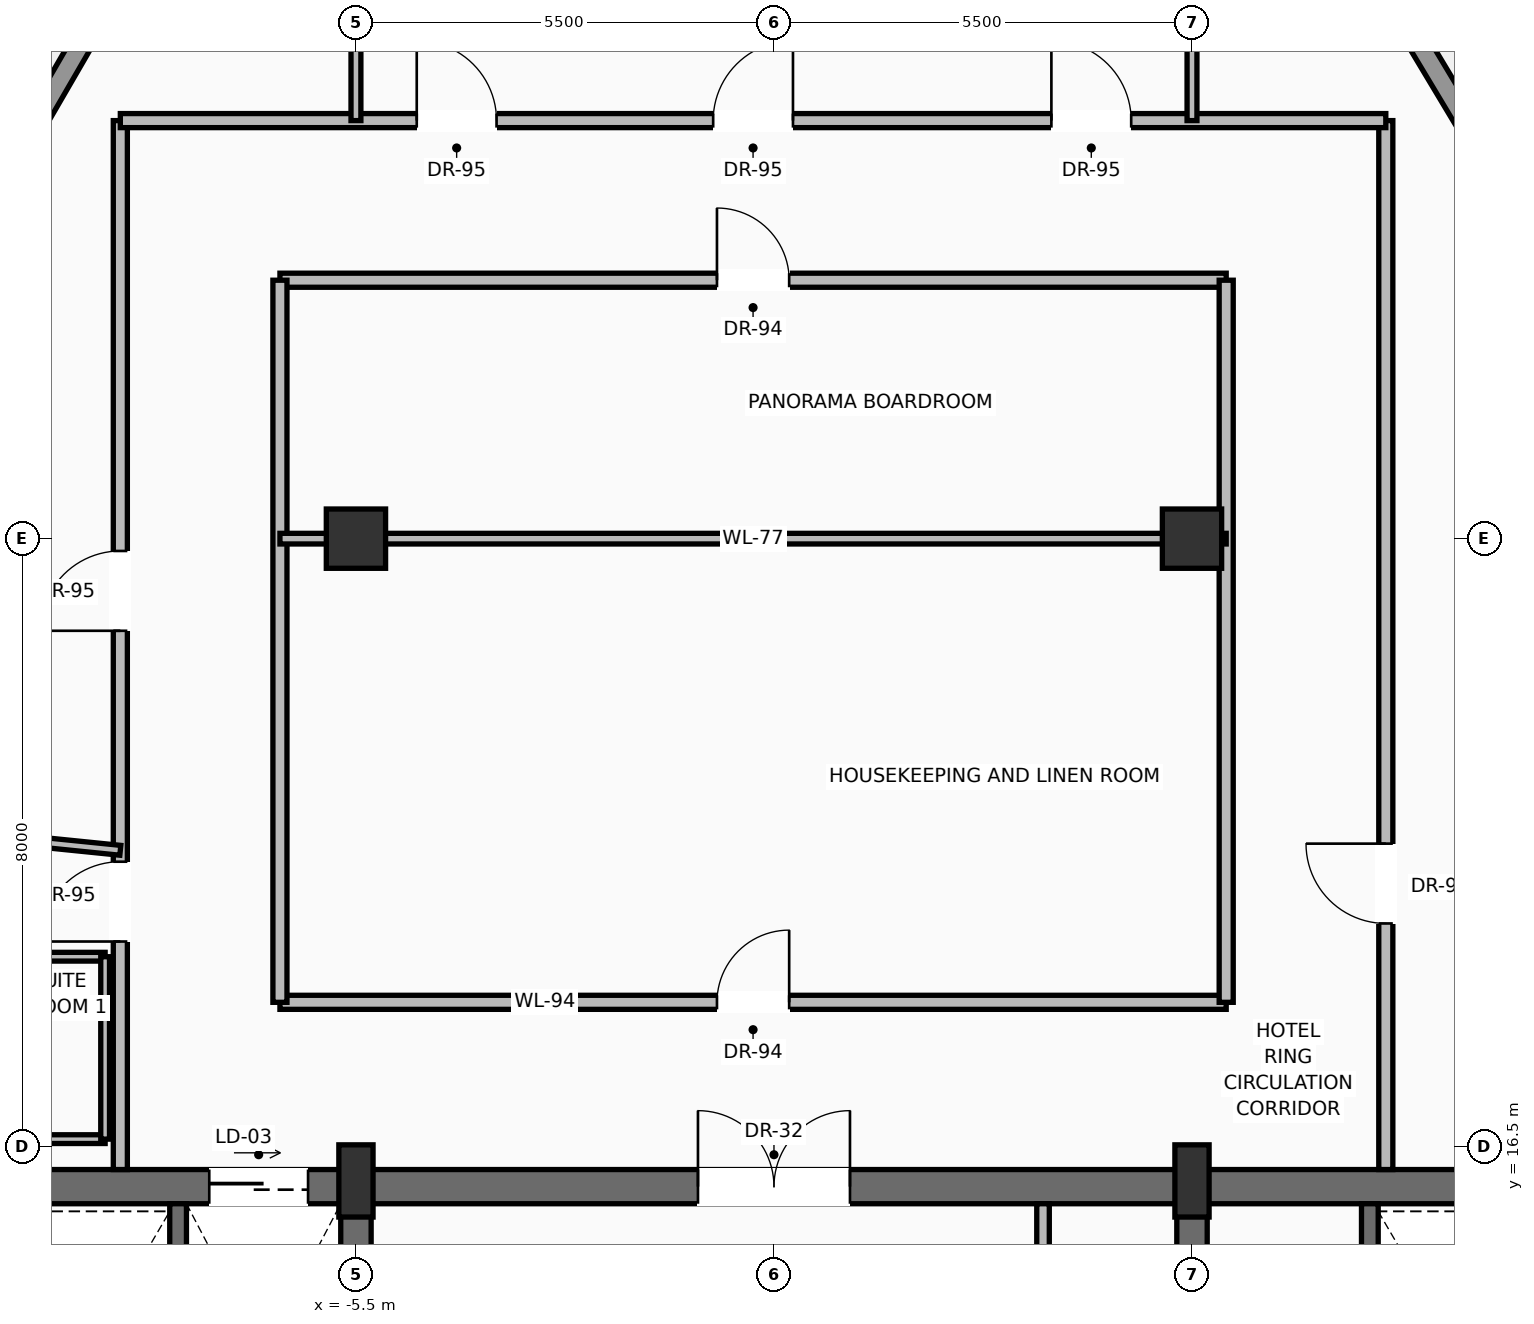
"""IFC4 building model, lengths in metres.
Left out: names, types, materials, properties, quantities, classifications, styles, units other than length and angle.
Written with IfcOpenShell. Run it as: python <this file> out.ifc"""

import sys

from ifc_helpers import new_model, si_unit, direction, frame, frame_2d, origin, origin_2d, place, context, subcontext, project, spatial, rectangle, extrude, source, transform, mapped, element, fill, save


model = new_model("IFC4")
c1 = context("Model", 3, precision=1e-05, world=origin(), true_north=direction((0.0, 1.0)))
c2 = subcontext(c1, "Body", "Model", "MODEL_VIEW")
j1 = project(units=[si_unit("LENGTHUNIT", "METRE"), si_unit("PLANEANGLEUNIT", "RADIAN")], contexts=[c1])
p1 = place(None, origin())
s1 = spatial("IfcSite", under=j1, at=p1, CompositionType="ELEMENT")
p2 = place(p1, origin())
s2 = spatial("IfcBuilding", under=s1, at=p2, CompositionType="ELEMENT")
p3 = place(p2, frame((0.0, 0.0, 266.1)))
s3 = spatial("IfcBuildingStorey", under=s2, at=p3, CompositionType="ELEMENT", Elevation=266.1)
p4 = place(p3, frame((-10.6, 15.975, 0.0), z_axis=(0.0, 0.0, 1.0), x_axis=(1.0, 0.0, 0.0)))
e1 = element("IfcWall", 1, at=p4, inside=s3, PredefinedType="SHEAR", context=c2, shape_type="SweptSolid", body=[
    extrude(rectangle(XDim=21.2, YDim=0.45, at=frame_2d((10.6, 0.0))), origin(), (0.0, 0.0, 1.0), 3.24),
])
p5 = place(p4, frame((3.17, 0.0, 0.0)))
e2 = element("IfcOpeningElement", 2, at=p5, cuts=e1, PredefinedType="OPENING", context=c2, shape_type="SweptSolid", body=[
    extrude(rectangle(XDim=1.3, YDim=2.3, at=frame_2d((0.65, 1.15))), frame((0.0, 0.235, 0.0), z_axis=(0.0, -1.0, 0.0), x_axis=(1.0, 0.0, 0.0)), (0.0, 0.0, 1.0), 0.47),
])
p6 = place(p4, frame((9.6, 0.0, 0.0)))
e3 = element("IfcOpeningElement", 3, at=p6, cuts=e1, PredefinedType="OPENING", context=c2, shape_type="SweptSolid", body=[
    extrude(rectangle(XDim=2.0, YDim=2.4, at=frame_2d((1.0, 1.2))), frame((0.0, 0.235, 0.0), z_axis=(0.0, -1.0, 0.0), x_axis=(1.0, 0.0, 0.0)), (0.0, 0.0, 1.0), 0.47),
])
p7 = place(p3, frame((-5.5, 0.625, 0.0), z_axis=(0.0, 0.0, 1.0), x_axis=(0.0, 1.0, 0.0)))
e4 = element("IfcWall", 4, at=p7, inside=s3, PredefinedType="SHEAR", context=c2, shape_type="SweptSolid", body=[
    extrude(rectangle(XDim=15.35, YDim=0.4, at=frame_2d((7.675, 0.0))), origin(), (0.0, 0.0, 1.0), 3.24),
])
p8 = place(p7, frame((8.875, 0.0, 0.0)))
e5 = element("IfcOpeningElement", 5, at=p8, cuts=e4, PredefinedType="OPENING", context=c2, shape_type="SweptSolid", body=[
    extrude(rectangle(XDim=1.1, YDim=2.2, at=frame_2d((0.55, 1.1))), frame((0.0, 0.21, 0.0), z_axis=(0.0, -1.0, 0.0), x_axis=(1.0, 0.0, 0.0)), (0.0, 0.0, 1.0), 0.42),
])
p9 = place(p3, frame((5.5, 0.625, 0.0), z_axis=(0.0, 0.0, 1.0), x_axis=(0.0, 1.0, 0.0)))
e6 = element("IfcWall", 6, at=p9, inside=s3, PredefinedType="SHEAR", context=c2, shape_type="SweptSolid", body=[
    extrude(rectangle(XDim=15.35, YDim=0.4, at=frame_2d((7.675, 0.0))), origin(), (0.0, 0.0, 1.0), 3.24),
])
p10 = place(p9, frame((8.875, 0.0, 0.0)))
e7 = element("IfcOpeningElement", 7, at=p10, cuts=e6, PredefinedType="OPENING", context=c2, shape_type="SweptSolid", body=[
    extrude(rectangle(XDim=1.1, YDim=2.2, at=frame_2d((0.55, 1.1))), frame((0.0, 0.21, 0.0), z_axis=(0.0, -1.0, 0.0), x_axis=(1.0, 0.0, 0.0)), (0.0, 0.0, 1.0), 0.42),
])
m1 = source(origin(), c2, "Body", "SweptSolid", [
    extrude(rectangle(XDim=0.45, YDim=0.95, at=origin_2d()), origin(), (0.0, 0.0, 1.0), 3.45),
])
for number, where, z_axis, x_axis in (
    (8, (-5.5, 16.05, 0.0), (0.0, 0.0, 1.0), (1.0, 0.0, 0.0)),
    (9, (5.5, 16.05, 0.0), (0.0, 0.0, 1.0), (1.0, 0.0, 0.0)),
):
    element("IfcColumn", number, at=place(p3, frame(where, z_axis=z_axis, x_axis=x_axis)), inside=s3, PredefinedType="PILASTER", context=c2, shape_type="MappedRepresentation", body=[
        mapped(m1, transform((0.0, 0.0, 0.0), scale=1.0)),
    ])
m2 = source(origin(), c2, "Body", "SweptSolid", [
    extrude(rectangle(XDim=0.78, YDim=0.78, at=origin_2d()), origin(), (0.0, 0.0, 1.0), 3.45),
])
for number, where, z_axis, x_axis in (
    (10, (-5.5, 24.5, 0.0), (0.0, 0.0, 1.0), (1.0, 0.0, 0.0)),
    (11, (5.5, 24.5, 0.0), (0.0, 0.0, 1.0), (1.0, 0.0, 0.0)),
):
    element("IfcColumn", number, at=place(p3, frame(where, z_axis=z_axis, x_axis=x_axis)), inside=s3, PredefinedType="COLUMN", context=c2, shape_type="MappedRepresentation", body=[
        mapped(m2, transform((0.0, 0.0, 0.0), scale=1.0)),
    ])
p11 = place(p3, frame((-18.713, 14.466, 0.0), z_axis=(0.0, 0.0, 1.0), x_axis=(0.501837095331, 0.864962155097, 0.0)))
e12 = element("IfcWall", 12, at=p11, inside=s3, PredefinedType="SOLIDWALL", context=c2, shape_type="SweptSolid", body=[
    extrude(rectangle(XDim=19.956, YDim=0.28, at=frame_2d((9.978, 0.0))), origin(), (0.0, 0.0, 1.0), 2.82),
])
p12 = place(p11, frame((4.789, 0.0, 0.0)))
e13 = element("IfcOpeningElement", 13, at=p12, cuts=e12, PredefinedType="OPENING", context=c2, shape_type="SweptSolid", body=[
    extrude(rectangle(XDim=1.6, YDim=2.35, at=frame_2d((0.8, 1.175))), frame((0.0, 0.15, 0.0), z_axis=(0.0, -1.0, 0.0), x_axis=(1.0, 0.0, 0.0)), (0.0, 0.0, 1.0), 0.3),
])
p13 = place(p11, frame((13.57, 0.0, 0.9)))
e14 = element("IfcOpeningElement", 14, at=p13, cuts=e12, PredefinedType="OPENING", context=c2, shape_type="SweptSolid", body=[
    extrude(rectangle(XDim=1.55, YDim=1.75, at=frame_2d((0.775, 0.875))), frame((0.0, 0.15, 0.0), z_axis=(0.0, -1.0, 0.0), x_axis=(1.0, 0.0, 0.0)), (0.0, 0.0, 1.0), 0.3),
])
p14 = place(p3, frame((7.995, 31.836, 0.0), z_axis=(0.0, 0.0, 1.0), x_axis=(0.514643481436, -0.8574042728, 0.0)))
e15 = element("IfcWall", 15, at=p14, inside=s3, PredefinedType="SOLIDWALL", context=c2, shape_type="SweptSolid", body=[
    extrude(rectangle(XDim=19.928, YDim=0.28, at=frame_2d((9.964, 0.0))), origin(), (0.0, 0.0, 1.0), 2.82),
])
p15 = place(p14, frame((4.783, 0.0, 0.0)))
e16 = element("IfcOpeningElement", 16, at=p15, cuts=e15, PredefinedType="OPENING", context=c2, shape_type="SweptSolid", body=[
    extrude(rectangle(XDim=1.6, YDim=2.35, at=frame_2d((0.8, 1.175))), frame((0.0, 0.15, 0.0), z_axis=(0.0, -1.0, 0.0), x_axis=(1.0, 0.0, 0.0)), (0.0, 0.0, 1.0), 0.3),
])
p16 = place(p14, frame((13.551, 0.0, 0.9)))
e17 = element("IfcOpeningElement", 17, at=p16, cuts=e15, PredefinedType="OPENING", context=c2, shape_type="SweptSolid", body=[
    extrude(rectangle(XDim=1.55, YDim=1.75, at=frame_2d((0.775, 0.875))), frame((0.0, 0.15, 0.0), z_axis=(0.0, -1.0, 0.0), x_axis=(1.0, 0.0, 0.0)), (0.0, 0.0, 1.0), 0.3),
])
for number, where, z_axis, x_axis in (
    (18, (-7.84, 11.87, 0.0), (0.0, 0.0, 1.0), (0.0, 1.0, 0.0)),
    (19, (7.84, 11.87, 0.0), (0.0, 0.0, 1.0), (0.0, 1.0, 0.0)),
):
    element("IfcWall", number, at=place(p3, frame(where, z_axis=z_axis, x_axis=x_axis)), inside=s3, PredefinedType="SOLIDWALL", context=c2, shape_type="SweptSolid", body=[
        extrude(rectangle(XDim=3.88, YDim=0.22, at=frame_2d((1.94, 0.0))), origin(), (0.0, 0.0, 1.0), 3.24),
    ])
p17 = place(p3, frame((3.54, 11.22, 0.0), z_axis=(0.0, 0.0, 1.0), x_axis=(0.0, 1.0, 0.0)))
e20 = element("IfcWall", 20, at=p17, inside=s3, PredefinedType="PARTITIONING", context=c2, shape_type="SweptSolid", body=[
    extrude(rectangle(XDim=4.53, YDim=0.165, at=frame_2d((2.265, 0.0))), origin(), (0.0, 0.0, 1.0), 3.232),
])
p18 = place(p17, frame((1.25, 0.0, 0.0)))
e21 = element("IfcOpeningElement", 21, at=p18, cuts=e20, PredefinedType="OPENING", context=c2, shape_type="SweptSolid", body=[
    extrude(rectangle(XDim=0.9, YDim=2.1, at=frame_2d((0.45, 1.05))), frame((0.0, 0.093, 0.0), z_axis=(0.0, -1.0, 0.0), x_axis=(1.0, 0.0, 0.0)), (0.0, 0.0, 1.0), 0.185),
])
p19 = place(p3, frame((-6.5, 18.4, 0.0), z_axis=(0.0, 0.0, 1.0), x_axis=(1.0, 0.0, 0.0)))
e22 = element("IfcWall", 22, at=p19, inside=s3, PredefinedType="PARTITIONING", context=c2, shape_type="SweptSolid", body=[
    extrude(rectangle(XDim=12.45, YDim=0.185, at=frame_2d((6.225, 0.0))), origin(), (0.0, 0.0, 1.0), 3.232),
])
p20 = place(p19, frame((5.75, 0.0, 0.0)))
e23 = element("IfcOpeningElement", 23, at=p20, cuts=e22, PredefinedType="OPENING", context=c2, shape_type="SweptSolid", body=[
    extrude(rectangle(XDim=0.95, YDim=2.2, at=frame_2d((0.475, 1.1))), frame((0.0, 0.103, 0.0), z_axis=(0.0, -1.0, 0.0), x_axis=(1.0, 0.0, 0.0)), (0.0, 0.0, 1.0), 0.205),
])
p21 = place(p3, frame((-6.5, 27.9, 0.0), z_axis=(0.0, 0.0, 1.0), x_axis=(1.0, 0.0, 0.0)))
e24 = element("IfcWall", 24, at=p21, inside=s3, PredefinedType="PARTITIONING", context=c2, shape_type="SweptSolid", body=[
    extrude(rectangle(XDim=12.45, YDim=0.185, at=frame_2d((6.225, 0.0))), origin(), (0.0, 0.0, 1.0), 2.885),
])
p22 = place(p21, frame((5.75, 0.0, 0.0)))
e25 = element("IfcOpeningElement", 25, at=p22, cuts=e24, PredefinedType="OPENING", context=c2, shape_type="SweptSolid", body=[
    extrude(rectangle(XDim=0.95, YDim=2.2, at=frame_2d((0.475, 1.1))), frame((0.0, 0.103, 0.0), z_axis=(0.0, -1.0, 0.0), x_axis=(1.0, 0.0, 0.0)), (0.0, 0.0, 1.0), 0.205),
])
for number, where, z_axis, x_axis in (
    (26, (-6.5, 18.4, 0.0), (0.0, 0.0, 1.0), (0.0, 1.0, 0.0)),
    (27, (5.95, 18.4, 0.0), (0.0, 0.0, 1.0), (0.0, 1.0, 0.0)),
):
    element("IfcWall", number, at=place(p3, frame(where, z_axis=z_axis, x_axis=x_axis)), inside=s3, PredefinedType="PARTITIONING", context=c2, shape_type="SweptSolid", body=[
        extrude(rectangle(XDim=9.5, YDim=0.185, at=frame_2d((4.75, 0.0))), origin(), (0.0, 0.0, 1.0), 3.232),
    ])
p23 = place(p3, frame((-8.6, 16.2, 0.0), z_axis=(0.0, 0.0, 1.0), x_axis=(0.0, 1.0, 0.0)))
e28 = element("IfcWall", 28, at=p23, inside=s3, PredefinedType="PARTITIONING", context=c2, shape_type="SweptSolid", body=[
    extrude(rectangle(XDim=13.8, YDim=0.185, at=frame_2d((6.9, 0.0))), origin(), (0.0, 0.0, 1.0), 3.232),
])
p24 = place(p23, frame((3.0, 0.0, 0.0)))
e29 = element("IfcOpeningElement", 29, at=p24, cuts=e28, PredefinedType="OPENING", context=c2, shape_type="SweptSolid", body=[
    extrude(rectangle(XDim=1.05, YDim=2.25, at=frame_2d((0.525, 1.125))), frame((0.0, 0.103, 0.0), z_axis=(0.0, -1.0, 0.0), x_axis=(1.0, 0.0, 0.0)), (0.0, 0.0, 1.0), 0.205),
])
p25 = place(p23, frame((7.088, 0.0, 0.0)))
e30 = element("IfcOpeningElement", 30, at=p25, cuts=e28, PredefinedType="OPENING", context=c2, shape_type="SweptSolid", body=[
    extrude(rectangle(XDim=1.05, YDim=2.25, at=frame_2d((0.525, 1.125))), frame((0.0, 0.103, 0.0), z_axis=(0.0, -1.0, 0.0), x_axis=(1.0, 0.0, 0.0)), (0.0, 0.0, 1.0), 0.205),
])
p26 = place(p3, frame((8.05, 16.2, 0.0), z_axis=(0.0, 0.0, 1.0), x_axis=(0.0, 1.0, 0.0)))
e31 = element("IfcWall", 31, at=p26, inside=s3, PredefinedType="PARTITIONING", context=c2, shape_type="SweptSolid", body=[
    extrude(rectangle(XDim=13.8, YDim=0.185, at=frame_2d((6.9, 0.0))), origin(), (0.0, 0.0, 1.0), 3.232),
])
p27 = place(p26, frame((3.238, 0.0, 0.0)))
e32 = element("IfcOpeningElement", 32, at=p27, cuts=e31, PredefinedType="OPENING", context=c2, shape_type="SweptSolid", body=[
    extrude(rectangle(XDim=1.05, YDim=2.25, at=frame_2d((0.525, 1.125))), frame((0.0, 0.103, 0.0), z_axis=(0.0, -1.0, 0.0), x_axis=(1.0, 0.0, 0.0)), (0.0, 0.0, 1.0), 0.205),
])
p28 = place(p3, frame((-8.6, 30.0, 0.0), z_axis=(0.0, 0.0, 1.0), x_axis=(1.0, 0.0, 0.0)))
e33 = element("IfcWall", 33, at=p28, inside=s3, PredefinedType="PARTITIONING", context=c2, shape_type="SweptSolid", body=[
    extrude(rectangle(XDim=16.65, YDim=0.185, at=frame_2d((8.325, 0.0))), origin(), (0.0, 0.0, 1.0), 3.232),
])
p29 = place(p28, frame((3.9, 0.0, 0.0)))
e34 = element("IfcOpeningElement", 34, at=p29, cuts=e33, PredefinedType="OPENING", context=c2, shape_type="SweptSolid", body=[
    extrude(rectangle(XDim=1.05, YDim=2.25, at=frame_2d((0.525, 1.125))), frame((0.0, 0.103, 0.0), z_axis=(0.0, -1.0, 0.0), x_axis=(1.0, 0.0, 0.0)), (0.0, 0.0, 1.0), 0.205),
])
p30 = place(p28, frame((7.8, 0.0, 0.0)))
e35 = element("IfcOpeningElement", 35, at=p30, cuts=e33, PredefinedType="OPENING", context=c2, shape_type="SweptSolid", body=[
    extrude(rectangle(XDim=1.05, YDim=2.25, at=frame_2d((0.525, 1.125))), frame((0.0, 0.103, 0.0), z_axis=(0.0, -1.0, 0.0), x_axis=(1.0, 0.0, 0.0)), (0.0, 0.0, 1.0), 0.205),
])
p31 = place(p28, frame((12.25, 0.0, 0.0)))
e36 = element("IfcOpeningElement", 36, at=p31, cuts=e33, PredefinedType="OPENING", context=c2, shape_type="SweptSolid", body=[
    extrude(rectangle(XDim=1.05, YDim=2.25, at=frame_2d((0.525, 1.125))), frame((0.0, 0.103, 0.0), z_axis=(0.0, -1.0, 0.0), x_axis=(1.0, 0.0, 0.0)), (0.0, 0.0, 1.0), 0.205),
])
p32 = place(p3, frame((-6.5, 24.5, 0.0), z_axis=(0.0, 0.0, 1.0), x_axis=(1.0, 0.0, 0.0)))
e37 = element("IfcWall", 37, at=p32, inside=s3, PredefinedType="PARTITIONING", context=c2, shape_type="SweptSolid", body=[
    extrude(rectangle(XDim=12.45, YDim=0.14, at=frame_2d((6.225, 0.0))), origin(), (0.0, 0.0, 1.0), 2.683),
])
p33 = place(p3, frame((-5.5, 30.0, 0.0), z_axis=(0.0, 0.0, 1.0), x_axis=(0.0, 1.0, 0.0)))
e38 = element("IfcWall", 38, at=p33, inside=s3, PredefinedType="PARTITIONING", context=c2, shape_type="SweptSolid", body=[
    extrude(rectangle(XDim=7.499, YDim=0.13, at=frame_2d((3.75, 0.0))), origin(), (0.0, 0.0, 1.0), 2.683),
])
p34 = place(p3, frame((5.5, 30.0, 0.0), z_axis=(0.0, 0.0, 1.0), x_axis=(0.0, 1.0, 0.0)))
e39 = element("IfcWall", 39, at=p34, inside=s3, PredefinedType="PARTITIONING", context=c2, shape_type="SweptSolid", body=[
    extrude(rectangle(XDim=6.246, YDim=0.13, at=frame_2d((3.123, 0.0))), origin(), (0.0, 0.0, 1.0), 2.683),
])
for number, where, z_axis, x_axis in (
    (40, (-11.45, 16.6, 0.0), (0.0, 0.0, 1.0), (1.0, 0.0, 0.0)),
    (41, (-11.45, 19.0, 0.0), (0.0, 0.0, 1.0), (1.0, 0.0, 0.0)),
):
    element("IfcWall", number, at=place(p3, frame(where, z_axis=z_axis, x_axis=x_axis)), inside=s3, PredefinedType="PARTITIONING", context=c2, shape_type="SweptSolid", body=[
        extrude(rectangle(XDim=2.65, YDim=0.115, at=frame_2d((1.325, 0.0))), origin(), (0.0, 0.0, 1.0), 3.232),
    ])
p35 = place(p3, frame((-8.8, 16.6, 0.0), z_axis=(0.0, 0.0, 1.0), x_axis=(0.0, 1.0, 0.0)))
e42 = element("IfcWall", 42, at=p35, inside=s3, PredefinedType="PARTITIONING", context=c2, shape_type="SweptSolid", body=[
    extrude(rectangle(XDim=2.4, YDim=0.115, at=frame_2d((1.2, 0.0))), origin(), (0.0, 0.0, 1.0), 3.232),
])
p36 = place(p3, frame((-15.042, 21.052, 0.0), z_axis=(0.0, 0.0, 1.0), x_axis=(0.994907937397, -0.100787876778, 0.0)))
e43 = element("IfcWall", 43, at=p36, inside=s3, PredefinedType="PARTITIONING", context=c2, shape_type="SweptSolid", body=[
    extrude(rectangle(XDim=6.475, YDim=0.13, at=frame_2d((3.237, 0.0))), origin(), (0.0, 0.0, 1.0), 3.232),
])
m3 = source(origin(), c2, "Body", "SweptSolid", [
    extrude(rectangle(XDim=1.3, YDim=2.3, at=frame_2d((0.65, 1.15))), frame((0.0, 0.025, 0.0), z_axis=(0.0, -1.0, 0.0), x_axis=(1.0, 0.0, 0.0)), (0.0, 0.0, 1.0), 0.05),
])
p37 = place(p5, origin())
e44 = element("IfcDoor", 44, at=p37, inside=s3, OperationType="SLIDING_TO_RIGHT", PredefinedType="DOOR", context=c2, shape_type="MappedRepresentation", body=[
    mapped(m3, transform((0.0, 0.0, 0.0), scale=1.0)),
])
fill(e2, e44)
m4 = source(origin(), c2, "Body", "SweptSolid", [
    extrude(rectangle(XDim=2.0, YDim=2.4, at=frame_2d((1.0, 1.2))), frame((0.0, 0.025, 0.0), z_axis=(0.0, -1.0, 0.0), x_axis=(1.0, 0.0, 0.0)), (0.0, 0.0, 1.0), 0.05),
])
p38 = place(p6, origin())
e45 = element("IfcDoor", 45, at=p38, inside=s3, OperationType="DOUBLE_DOOR_SINGLE_SWING", PredefinedType="DOOR", context=c2, shape_type="MappedRepresentation", body=[
    mapped(m4, transform((0.0, 0.0, 0.0), scale=1.0)),
])
fill(e3, e45)
m5 = source(origin(), c2, "Body", "SweptSolid", [
    extrude(rectangle(XDim=0.95, YDim=2.2, at=frame_2d((0.475, 1.1))), frame((0.0, 0.025, 0.0), z_axis=(0.0, -1.0, 0.0), x_axis=(1.0, 0.0, 0.0)), (0.0, 0.0, 1.0), 0.05),
])
p39 = place(p20, origin())
e46 = element("IfcDoor", 46, at=p39, inside=s3, OperationType="SINGLE_SWING_RIGHT", PredefinedType="DOOR", context=c2, shape_type="MappedRepresentation", body=[
    mapped(m5, transform((0.0, 0.0, 0.0), scale=1.0)),
])
fill(e23, e46)
p40 = place(p22, origin())
e47 = element("IfcDoor", 47, at=p40, inside=s3, OperationType="SINGLE_SWING_LEFT", PredefinedType="DOOR", context=c2, shape_type="MappedRepresentation", body=[
    mapped(m5, transform((0.0, 0.0, 0.0), scale=1.0)),
])
fill(e25, e47)
m6 = source(origin(), c2, "Body", "SweptSolid", [
    extrude(rectangle(XDim=1.05, YDim=2.25, at=frame_2d((0.525, 1.125))), frame((0.0, 0.025, 0.0), z_axis=(0.0, -1.0, 0.0), x_axis=(1.0, 0.0, 0.0)), (0.0, 0.0, 1.0), 0.05),
])
p41 = place(p24, origin())
e48 = element("IfcDoor", 48, at=p41, inside=s3, OperationType="SINGLE_SWING_LEFT", PredefinedType="DOOR", context=c2, shape_type="MappedRepresentation", body=[
    mapped(m6, transform((0.0, 0.0, 0.0), scale=1.0)),
])
fill(e29, e48)
p42 = place(p25, origin())
e49 = element("IfcDoor", 49, at=p42, inside=s3, OperationType="SINGLE_SWING_LEFT", PredefinedType="DOOR", context=c2, shape_type="MappedRepresentation", body=[
    mapped(m6, transform((0.0, 0.0, 0.0), scale=1.0)),
])
fill(e30, e49)
p43 = place(p27, origin())
e50 = element("IfcDoor", 50, at=p43, inside=s3, OperationType="SINGLE_SWING_RIGHT", PredefinedType="DOOR", context=c2, shape_type="MappedRepresentation", body=[
    mapped(m6, transform((0.0, 0.0, 0.0), scale=1.0)),
])
fill(e32, e50)
p44 = place(p29, origin())
e51 = element("IfcDoor", 51, at=p44, inside=s3, OperationType="SINGLE_SWING_LEFT", PredefinedType="DOOR", context=c2, shape_type="MappedRepresentation", body=[
    mapped(m6, transform((0.0, 0.0, 0.0), scale=1.0)),
])
fill(e34, e51)
p45 = place(p30, origin())
e52 = element("IfcDoor", 52, at=p45, inside=s3, OperationType="SINGLE_SWING_RIGHT", PredefinedType="DOOR", context=c2, shape_type="MappedRepresentation", body=[
    mapped(m6, transform((0.0, 0.0, 0.0), scale=1.0)),
])
fill(e35, e52)
p46 = place(p31, origin())
e53 = element("IfcDoor", 53, at=p46, inside=s3, OperationType="SINGLE_SWING_LEFT", PredefinedType="DOOR", context=c2, shape_type="MappedRepresentation", body=[
    mapped(m6, transform((0.0, 0.0, 0.0), scale=1.0)),
])
fill(e36, e53)
save(model, sys.argv[1])
